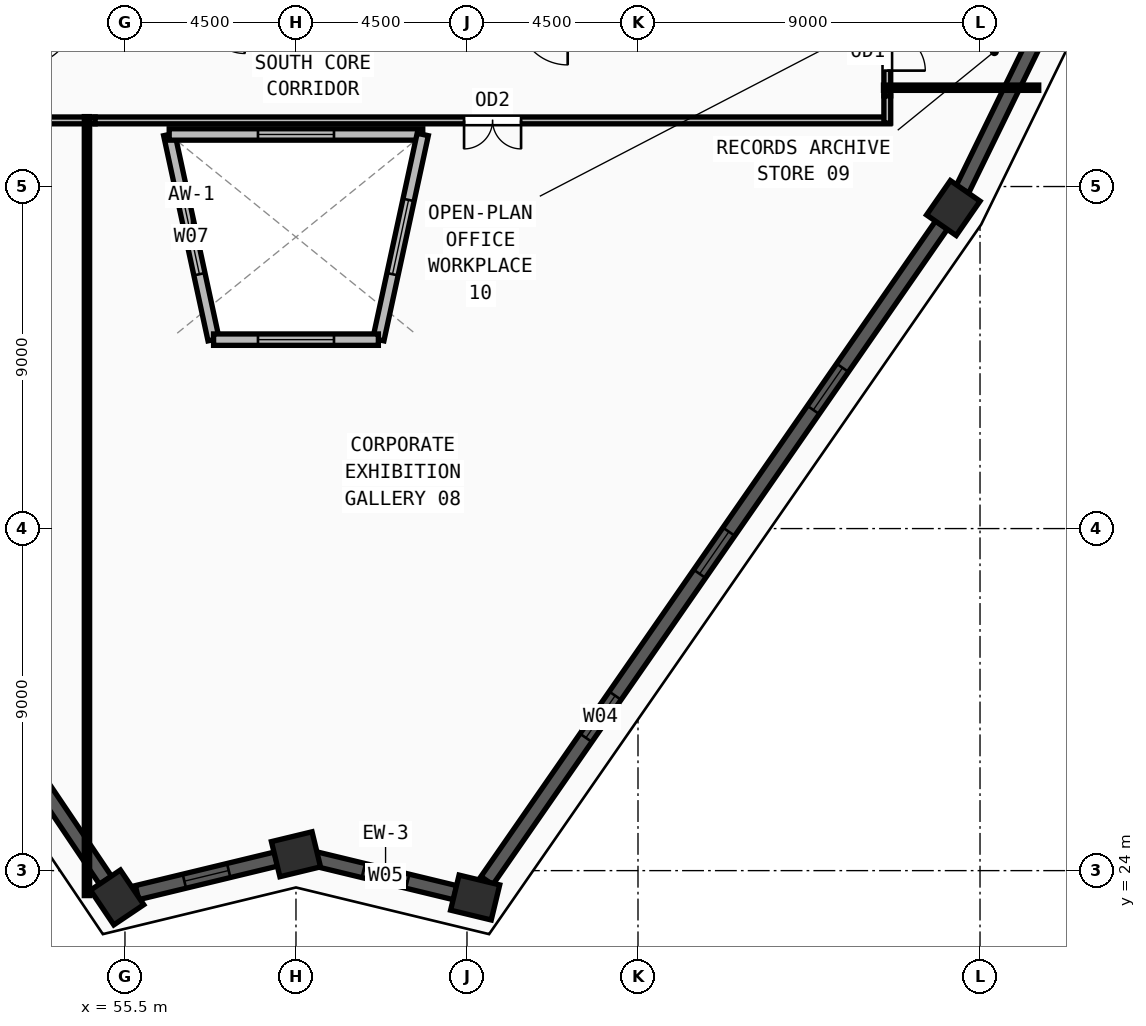
"""IFC4 building model, lengths in metres.
Left out: names, types, materials, properties, quantities, classifications, styles, units other than length and angle.
Written with IfcOpenShell. Run it as: python <this file> out.ifc"""

import sys

from ifc_helpers import new_model, si_unit, direction, frame, frame_2d, origin, origin_2d, place, context, subcontext, project, spatial, rectangle, extrude, source, transform, mapped, element, fill, save


model = new_model("IFC4")
c1 = context("Model", 3, precision=1e-05, world=origin(), true_north=direction((0.0, 1.0)))
c2 = subcontext(c1, "Body", "Model", "MODEL_VIEW")
j1 = project(units=[si_unit("LENGTHUNIT", "METRE"), si_unit("PLANEANGLEUNIT", "RADIAN")], contexts=[c1])
p1 = place(None, origin())
s1 = spatial("IfcSite", under=j1, at=p1, CompositionType="ELEMENT")
p2 = place(p1, origin())
s2 = spatial("IfcBuilding", under=s1, at=p2, CompositionType="ELEMENT")
p3 = place(p2, frame((0.0, 0.0, 339.75)))
s3 = spatial("IfcBuildingStorey", under=s2, at=p3, CompositionType="ELEMENT", Elevation=339.75)
m1 = source(origin(), c2, "Body", "SweptSolid", [
    extrude(rectangle(XDim=1.1, YDim=0.95, at=origin_2d()), origin(), (0.0, 0.0, 1.0), 3.75),
])
for number, where, z_axis, x_axis in (
    (1, (55.293, 23.294, 0.0), (0.0, 0.0, 1.0), (-0.559, 0.829, 0.0)),
    (2, (77.297, 41.434, 0.0), (0.0, 0.0, 1.0), (0.57, 0.822, 0.0)),
    (3, (64.715, 23.292, 0.0), (0.0, 0.0, 1.0), (-0.972, 0.235, 0.0)),
    (4, (60.0, 24.431, 0.0), (0.0, 0.0, 1.0), (0.972, 0.235, 0.0)),
):
    element("IfcColumn", number, at=place(p3, frame(where, z_axis=z_axis, x_axis=x_axis)), inside=s3, PredefinedType="COLUMN", context=c2, shape_type="MappedRepresentation", body=[
        mapped(m1, transform((0.0, 0.0, 0.0), x_axis=(1.0, 0.0, 0.0), y_axis=(0.0, 1.0, 0.0), z_axis=(0.0, 0.0, 1.0), scale=1.0)),
    ])
p4 = place(p3, frame((60.525, 24.304, 0.0), z_axis=(0.0, 0.0, 1.0), x_axis=(0.972061323931, -0.234727038319, 0.0)))
e5 = element("IfcWall", 5, at=p4, inside=s3, PredefinedType="SOLIDWALL", context=c2, shape_type="SweptSolid", body=[
    extrude(rectangle(XDim=3.77, YDim=0.38, at=frame_2d((1.885, 0.0))), origin(), (0.0, 0.0, 1.0), 3.57),
])
m2 = source(origin(), c2, "Body", "SweptSolid", [
    extrude(rectangle(XDim=1.2, YDim=1.9, at=frame_2d((0.6, 0.95))), frame((0.0, 0.2, 0.0), z_axis=(0.0, -1.0, 0.0), x_axis=(1.0, 0.0, 0.0)), (0.0, 0.0, 1.0), 0.4),
])
p5 = place(p4, frame((1.285, 0.0, 0.55)))
e6 = element("IfcOpeningElement", 6, at=p5, cuts=e5, PredefinedType="OPENING", context=c2, shape_type="MappedRepresentation", body=[
    mapped(m2, transform((0.0, 0.0, 0.0), x_axis=(1.0, 0.0, 0.0), y_axis=(0.0, 1.0, 0.0), z_axis=(0.0, 0.0, 1.0), scale=1.0)),
])
p6 = place(p3, frame((65.023, 23.736, 0.0), z_axis=(0.0, 0.0, 1.0), x_axis=(0.569887562459, 0.821722682025, 0.0)))
e7 = element("IfcWall", 7, at=p6, inside=s3, PredefinedType="SOLIDWALL", context=c2, shape_type="SweptSolid", body=[
    extrude(rectangle(XDim=20.997, YDim=0.38, at=frame_2d((10.499, 0.0))), origin(), (0.0, 0.0, 1.0), 3.57),
])
m3 = source(origin(), c2, "Body", "SweptSolid", [
    extrude(rectangle(XDim=1.35, YDim=1.85, at=frame_2d((0.675, 0.925))), frame((0.0, 0.2, 0.0), z_axis=(0.0, -1.0, 0.0), x_axis=(1.0, 0.0, 0.0)), (0.0, 0.0, 1.0), 0.4),
])
p7 = place(p6, frame((4.574, 0.0, 0.55)))
e8 = element("IfcOpeningElement", 8, at=p7, cuts=e7, PredefinedType="OPENING", context=c2, shape_type="MappedRepresentation", body=[
    mapped(m3, transform((0.0, 0.0, 0.0), x_axis=(1.0, 0.0, 0.0), y_axis=(0.0, 1.0, 0.0), z_axis=(0.0, 0.0, 1.0), scale=1.0)),
])
p8 = place(p6, frame((9.824, 0.0, 0.55)))
e9 = element("IfcOpeningElement", 9, at=p8, cuts=e7, PredefinedType="OPENING", context=c2, shape_type="MappedRepresentation", body=[
    mapped(m3, transform((0.0, 0.0, 0.0), x_axis=(1.0, 0.0, 0.0), y_axis=(0.0, 1.0, 0.0), z_axis=(0.0, 0.0, 1.0), scale=1.0)),
])
p9 = place(p6, frame((15.073, 0.0, 0.55)))
e10 = element("IfcOpeningElement", 10, at=p9, cuts=e7, PredefinedType="OPENING", context=c2, shape_type="MappedRepresentation", body=[
    mapped(m3, transform((0.0, 0.0, 0.0), x_axis=(1.0, 0.0, 0.0), y_axis=(0.0, 1.0, 0.0), z_axis=(0.0, 0.0, 1.0), scale=1.0)),
])
p10 = place(p3, frame((77.534, 41.919, 0.0), z_axis=(0.0, 0.0, 1.0), x_axis=(0.438992867409, 0.898490546619, 0.0)))
e11 = element("IfcWall", 11, at=p10, inside=s3, PredefinedType="SOLIDWALL", context=c2, shape_type="SweptSolid", body=[
    extrude(rectangle(XDim=25.456, YDim=0.38, at=frame_2d((12.728, 0.0))), origin(), (0.0, 0.0, 1.0), 3.57),
])
p11 = place(p10, frame((12.053, 0.0, 0.55)))
e12 = element("IfcOpeningElement", 12, at=p11, cuts=e11, PredefinedType="OPENING", context=c2, shape_type="MappedRepresentation", body=[
    mapped(m3, transform((0.0, 0.0, 0.0), x_axis=(1.0, 0.0, 0.0), y_axis=(0.0, 1.0, 0.0), z_axis=(0.0, 0.0, 1.0), scale=1.0)),
])
p12 = place(p10, frame((18.417, 0.0, 0.55)))
e13 = element("IfcOpeningElement", 13, at=p12, cuts=e11, PredefinedType="OPENING", context=c2, shape_type="MappedRepresentation", body=[
    mapped(m3, transform((0.0, 0.0, 0.0), x_axis=(1.0, 0.0, 0.0), y_axis=(0.0, 1.0, 0.0), z_axis=(0.0, 0.0, 1.0), scale=1.0)),
])
p13 = place(p3, frame((40.771, 44.855, 0.0), z_axis=(0.0, 0.0, 1.0), x_axis=(0.558627041585, -0.82941897037, 0.0)))
e14 = element("IfcWall", 14, at=p13, inside=s3, PredefinedType="SOLIDWALL", context=c2, shape_type="SweptSolid", body=[
    extrude(rectangle(XDim=25.455, YDim=0.38, at=frame_2d((12.728, 0.0))), origin(), (0.0, 0.0, 1.0), 3.57),
])
p14 = place(p13, frame((5.689, 0.0, 0.55)))
e15 = element("IfcOpeningElement", 15, at=p14, cuts=e14, PredefinedType="OPENING", context=c2, shape_type="MappedRepresentation", body=[
    mapped(m3, transform((0.0, 0.0, 0.0), x_axis=(1.0, 0.0, 0.0), y_axis=(0.0, 1.0, 0.0), z_axis=(0.0, 0.0, 1.0), scale=1.0)),
])
p15 = place(p13, frame((12.053, 0.0, 0.55)))
e16 = element("IfcOpeningElement", 16, at=p15, cuts=e14, PredefinedType="OPENING", context=c2, shape_type="MappedRepresentation", body=[
    mapped(m3, transform((0.0, 0.0, 0.0), x_axis=(1.0, 0.0, 0.0), y_axis=(0.0, 1.0, 0.0), z_axis=(0.0, 0.0, 1.0), scale=1.0)),
])
p16 = place(p13, frame((18.416, 0.0, 0.55)))
e17 = element("IfcOpeningElement", 17, at=p16, cuts=e14, PredefinedType="OPENING", context=c2, shape_type="MappedRepresentation", body=[
    mapped(m3, transform((0.0, 0.0, 0.0), x_axis=(1.0, 0.0, 0.0), y_axis=(0.0, 1.0, 0.0), z_axis=(0.0, 0.0, 1.0), scale=1.0)),
])
p17 = place(p3, frame((55.818, 23.421, 0.0), z_axis=(0.0, 0.0, 1.0), x_axis=(0.972061788498, 0.234725114427, 0.0)))
e18 = element("IfcWall", 18, at=p17, inside=s3, PredefinedType="SOLIDWALL", context=c2, shape_type="SweptSolid", body=[
    extrude(rectangle(XDim=3.762, YDim=0.38, at=frame_2d((1.881, 0.0))), origin(), (0.0, 0.0, 1.0), 3.57),
])
p18 = place(p17, frame((1.281, 0.0, 0.55)))
e19 = element("IfcOpeningElement", 19, at=p18, cuts=e18, PredefinedType="OPENING", context=c2, shape_type="MappedRepresentation", body=[
    mapped(m2, transform((0.0, 0.0, 0.0), x_axis=(1.0, 0.0, 0.0), y_axis=(0.0, 1.0, 0.0), z_axis=(0.0, 0.0, 1.0), scale=1.0)),
])
p19 = place(p3, frame((57.832, 37.971, 0.0), z_axis=(0.0, 0.0, 1.0), x_axis=(-0.211433211418, 0.977392447848, 0.0)))
e20 = element("IfcWall", 20, at=p19, inside=s3, PredefinedType="SOLIDWALL", context=c2, shape_type="SweptSolid", body=[
    extrude(rectangle(XDim=5.524, YDim=0.3, at=frame_2d((2.762, 0.0))), origin(), (0.0, 0.0, 1.0), 3.57),
])
m4 = source(origin(), c2, "Body", "SweptSolid", [
    extrude(rectangle(XDim=2.0, YDim=1.9, at=frame_2d((1.0, 0.95))), frame((0.0, 0.16, 0.0), z_axis=(0.0, -1.0, 0.0), x_axis=(1.0, 0.0, 0.0)), (0.0, 0.0, 1.0), 0.32),
])
p20 = place(p19, frame((1.762, 0.0, 0.55)))
e21 = element("IfcOpeningElement", 21, at=p20, cuts=e20, PredefinedType="OPENING", context=c2, shape_type="MappedRepresentation", body=[
    mapped(m4, transform((0.0, 0.0, 0.0), x_axis=(1.0, 0.0, 0.0), y_axis=(0.0, 1.0, 0.0), z_axis=(0.0, 0.0, 1.0), scale=1.0)),
])
p21 = place(p3, frame((56.664, 43.37, 0.0), z_axis=(0.0, 0.0, 1.0), x_axis=(1.0, 0.0, 0.0)))
e22 = element("IfcWall", 22, at=p21, inside=s3, PredefinedType="SOLIDWALL", context=c2, shape_type="SweptSolid", body=[
    extrude(rectangle(XDim=6.672, YDim=0.3, at=frame_2d((3.336, 0.0))), origin(), (0.0, 0.0, 1.0), 3.57),
])
p22 = place(p21, frame((2.336, 0.0, 0.55)))
e23 = element("IfcOpeningElement", 23, at=p22, cuts=e22, PredefinedType="OPENING", context=c2, shape_type="MappedRepresentation", body=[
    mapped(m4, transform((0.0, 0.0, 0.0), x_axis=(1.0, 0.0, 0.0), y_axis=(0.0, 1.0, 0.0), z_axis=(0.0, 0.0, 1.0), scale=1.0)),
])
p23 = place(p3, frame((63.336, 43.37, 0.0), z_axis=(0.0, 0.0, 1.0), x_axis=(-0.211433211418, -0.977392447848, 0.0)))
e24 = element("IfcWall", 24, at=p23, inside=s3, PredefinedType="SOLIDWALL", context=c2, shape_type="SweptSolid", body=[
    extrude(rectangle(XDim=5.524, YDim=0.3, at=frame_2d((2.762, 0.0))), origin(), (0.0, 0.0, 1.0), 3.57),
])
p24 = place(p23, frame((1.762, 0.0, 0.55)))
e25 = element("IfcOpeningElement", 25, at=p24, cuts=e24, PredefinedType="OPENING", context=c2, shape_type="MappedRepresentation", body=[
    mapped(m4, transform((0.0, 0.0, 0.0), x_axis=(1.0, 0.0, 0.0), y_axis=(0.0, 1.0, 0.0), z_axis=(0.0, 0.0, 1.0), scale=1.0)),
])
p25 = place(p3, frame((62.168, 37.971, 0.0), z_axis=(0.0, 0.0, 1.0), x_axis=(-1.0, 0.0, 0.0)))
e26 = element("IfcWall", 26, at=p25, inside=s3, PredefinedType="SOLIDWALL", context=c2, shape_type="SweptSolid", body=[
    extrude(rectangle(XDim=4.336, YDim=0.3, at=frame_2d((2.168, 0.0))), origin(), (0.0, 0.0, 1.0), 3.57),
])
p26 = place(p25, frame((1.168, 0.0, 0.55)))
e27 = element("IfcOpeningElement", 27, at=p26, cuts=e26, PredefinedType="OPENING", context=c2, shape_type="MappedRepresentation", body=[
    mapped(m4, transform((0.0, 0.0, 0.0), x_axis=(1.0, 0.0, 0.0), y_axis=(0.0, 1.0, 0.0), z_axis=(0.0, 0.0, 1.0), scale=1.0)),
])
p27 = place(p3, frame((54.715, 43.74, 0.0), z_axis=(0.0, 0.0, 1.0), x_axis=(-1.0, 0.0, 0.0)))
e28 = element("IfcWall", 28, at=p27, inside=s3, PredefinedType="PARTITIONING", context=c2, shape_type="SweptSolid", body=[
    extrude(rectangle(XDim=10.345, YDim=0.18, at=frame_2d((5.172, 0.0))), origin(), (0.0, 0.0, 1.0), 3.57),
])
m5 = source(origin(), c2, "Body", "SweptSolid", [
    extrude(rectangle(XDim=1.5, YDim=2.2, at=frame_2d((0.75, 1.1))), frame((0.0, 0.1, 0.0), z_axis=(0.0, -1.0, 0.0), x_axis=(1.0, 0.0, 0.0)), (0.0, 0.0, 1.0), 0.2),
])
p28 = place(p27, frame((4.423, 0.0, 0.0)))
e29 = element("IfcOpeningElement", 29, at=p28, cuts=e28, PredefinedType="OPENING", context=c2, shape_type="MappedRepresentation", body=[
    mapped(m5, transform((0.0, 0.0, 0.0), x_axis=(1.0, 0.0, 0.0), y_axis=(0.0, 1.0, 0.0), z_axis=(0.0, 0.0, 1.0), scale=1.0)),
])
p29 = place(p3, frame((75.63, 43.74, 0.0), z_axis=(0.0, 0.0, 1.0), x_axis=(-1.0, 0.0, 0.0)))
e30 = element("IfcWall", 30, at=p29, inside=s3, PredefinedType="PARTITIONING", context=c2, shape_type="SweptSolid", body=[
    extrude(rectangle(XDim=20.915, YDim=0.18, at=frame_2d((10.458, 0.0))), origin(), (0.0, 0.0, 1.0), 3.57),
])
p30 = place(p29, frame((9.707, 0.0, 0.0)))
e31 = element("IfcOpeningElement", 31, at=p30, cuts=e30, PredefinedType="OPENING", context=c2, shape_type="MappedRepresentation", body=[
    mapped(m5, transform((0.0, 0.0, 0.0), x_axis=(1.0, 0.0, 0.0), y_axis=(0.0, 1.0, 0.0), z_axis=(0.0, 0.0, 1.0), scale=1.0)),
])
p31 = place(p3, frame((75.56, 46.715, 0.0), z_axis=(0.0, 0.0, 1.0), x_axis=(0.0, -1.0, 0.0)))
e32 = element("IfcWall", 32, at=p31, inside=s3, PredefinedType="PARTITIONING", context=c2, shape_type="SweptSolid", body=[
    extrude(rectangle(XDim=2.33, YDim=0.18, at=frame_2d((1.165, 0.0))), origin(), (0.0, 0.0, 1.0), 3.57),
])
m6 = source(origin(), c2, "Body", "SweptSolid", [
    extrude(rectangle(XDim=1.0, YDim=2.2, at=frame_2d((0.5, 1.1))), frame((0.0, 0.1, 0.0), z_axis=(0.0, -1.0, 0.0), x_axis=(1.0, 0.0, 0.0)), (0.0, 0.0, 1.0), 0.2),
])
p32 = place(p31, frame((0.665, 0.0, 0.0)))
e33 = element("IfcOpeningElement", 33, at=p32, cuts=e32, PredefinedType="OPENING", context=c2, shape_type="MappedRepresentation", body=[
    mapped(m6, transform((0.0, 0.0, 0.0), x_axis=(1.0, 0.0, 0.0), y_axis=(0.0, 1.0, 0.0), z_axis=(0.0, 0.0, 1.0), scale=1.0)),
])
p33 = place(p3, frame((75.56, 44.385, 0.0), z_axis=(0.0, 0.0, 1.0), x_axis=(0.0, -1.0, 0.0)))
e34 = element("IfcWall", 34, at=p33, inside=s3, PredefinedType="PARTITIONING", context=c2, shape_type="SweptSolid", body=[
    extrude(rectangle(XDim=0.715, YDim=0.18, at=frame_2d((0.357, 0.0))), origin(), (0.0, 0.0, 1.0), 3.57),
])
p34 = place(p3, frame((75.46, 44.6, 0.0), z_axis=(0.0, 0.0, 1.0), x_axis=(1.0, 0.0, 0.0)))
e35 = element("IfcWall", 35, at=p34, inside=s3, PredefinedType="PARTITIONING", context=c2, shape_type="SweptSolid", body=[
    extrude(rectangle(XDim=4.085, YDim=0.14, at=frame_2d((2.042, 0.0))), origin(), (0.0, 0.0, 1.0), 3.57),
])
p35 = place(p3, frame((54.5, 43.84, 0.0), z_axis=(0.0, 0.0, 1.0), x_axis=(0.0, -1.0, 0.0)))
e36 = element("IfcWall", 36, at=p35, inside=s3, PredefinedType="PARTITIONING", context=c2, shape_type="SweptSolid", body=[
    extrude(rectangle(XDim=20.497, YDim=0.14, at=frame_2d((10.249, 0.0))), origin(), (0.0, 0.0, 1.0), 2.967),
])
m7 = source(origin(), c2, "Body", "SweptSolid", [
    extrude(rectangle(XDim=1.2, YDim=1.9, at=frame_2d((0.6, 0.95))), frame((0.0, 0.03, 0.0), z_axis=(0.0, -1.0, 0.0), x_axis=(1.0, 0.0, 0.0)), (0.0, 0.0, 1.0), 0.06),
])
p36 = place(p5, origin())
e37 = element("IfcWindow", 37, at=p36, inside=s3, PartitioningType="SINGLE_PANEL", PredefinedType="WINDOW", context=c2, shape_type="MappedRepresentation", body=[
    mapped(m7, transform((0.0, 0.0, 0.0), x_axis=(1.0, 0.0, 0.0), y_axis=(0.0, 1.0, 0.0), z_axis=(0.0, 0.0, 1.0), scale=1.0)),
])
fill(e6, e37)
m8 = source(origin(), c2, "Body", "SweptSolid", [
    extrude(rectangle(XDim=1.35, YDim=1.85, at=frame_2d((0.675, 0.925))), frame((0.0, 0.03, 0.0), z_axis=(0.0, -1.0, 0.0), x_axis=(1.0, 0.0, 0.0)), (0.0, 0.0, 1.0), 0.06),
])
p37 = place(p7, origin())
e38 = element("IfcWindow", 38, at=p37, inside=s3, PartitioningType="SINGLE_PANEL", PredefinedType="WINDOW", context=c2, shape_type="MappedRepresentation", body=[
    mapped(m8, transform((0.0, 0.0, 0.0), x_axis=(1.0, 0.0, 0.0), y_axis=(0.0, 1.0, 0.0), z_axis=(0.0, 0.0, 1.0), scale=1.0)),
])
fill(e8, e38)
p38 = place(p8, origin())
e39 = element("IfcWindow", 39, at=p38, inside=s3, PartitioningType="SINGLE_PANEL", PredefinedType="WINDOW", context=c2, shape_type="MappedRepresentation", body=[
    mapped(m8, transform((0.0, 0.0, 0.0), x_axis=(1.0, 0.0, 0.0), y_axis=(0.0, 1.0, 0.0), z_axis=(0.0, 0.0, 1.0), scale=1.0)),
])
fill(e9, e39)
p39 = place(p9, origin())
e40 = element("IfcWindow", 40, at=p39, inside=s3, PartitioningType="SINGLE_PANEL", PredefinedType="WINDOW", context=c2, shape_type="MappedRepresentation", body=[
    mapped(m8, transform((0.0, 0.0, 0.0), x_axis=(1.0, 0.0, 0.0), y_axis=(0.0, 1.0, 0.0), z_axis=(0.0, 0.0, 1.0), scale=1.0)),
])
fill(e10, e40)
p40 = place(p18, origin())
e41 = element("IfcWindow", 41, at=p40, inside=s3, PartitioningType="SINGLE_PANEL", PredefinedType="WINDOW", context=c2, shape_type="MappedRepresentation", body=[
    mapped(m7, transform((0.0, 0.0, 0.0), x_axis=(1.0, 0.0, 0.0), y_axis=(0.0, 1.0, 0.0), z_axis=(0.0, 0.0, 1.0), scale=1.0)),
])
fill(e19, e41)
m9 = source(origin(), c2, "Body", "SweptSolid", [
    extrude(rectangle(XDim=2.0, YDim=1.9, at=frame_2d((1.0, 0.95))), frame((0.0, 0.03, 0.0), z_axis=(0.0, -1.0, 0.0), x_axis=(1.0, 0.0, 0.0)), (0.0, 0.0, 1.0), 0.06),
])
p41 = place(p20, origin())
e42 = element("IfcWindow", 42, at=p41, inside=s3, PartitioningType="DOUBLE_PANEL_VERTICAL", PredefinedType="WINDOW", context=c2, shape_type="MappedRepresentation", body=[
    mapped(m9, transform((0.0, 0.0, 0.0), x_axis=(1.0, 0.0, 0.0), y_axis=(0.0, 1.0, 0.0), z_axis=(0.0, 0.0, 1.0), scale=1.0)),
])
fill(e21, e42)
p42 = place(p22, origin())
e43 = element("IfcWindow", 43, at=p42, inside=s3, PartitioningType="DOUBLE_PANEL_VERTICAL", PredefinedType="WINDOW", context=c2, shape_type="MappedRepresentation", body=[
    mapped(m9, transform((0.0, 0.0, 0.0), x_axis=(1.0, 0.0, 0.0), y_axis=(0.0, 1.0, 0.0), z_axis=(0.0, 0.0, 1.0), scale=1.0)),
])
fill(e23, e43)
p43 = place(p24, origin())
e44 = element("IfcWindow", 44, at=p43, inside=s3, PartitioningType="DOUBLE_PANEL_VERTICAL", PredefinedType="WINDOW", context=c2, shape_type="MappedRepresentation", body=[
    mapped(m9, transform((0.0, 0.0, 0.0), x_axis=(1.0, 0.0, 0.0), y_axis=(0.0, 1.0, 0.0), z_axis=(0.0, 0.0, 1.0), scale=1.0)),
])
fill(e25, e44)
p44 = place(p26, origin())
e45 = element("IfcWindow", 45, at=p44, inside=s3, PartitioningType="DOUBLE_PANEL_VERTICAL", PredefinedType="WINDOW", context=c2, shape_type="MappedRepresentation", body=[
    mapped(m9, transform((0.0, 0.0, 0.0), x_axis=(1.0, 0.0, 0.0), y_axis=(0.0, 1.0, 0.0), z_axis=(0.0, 0.0, 1.0), scale=1.0)),
])
fill(e27, e45)
m10 = source(origin(), c2, "Body", "SweptSolid", [
    extrude(rectangle(XDim=1.5, YDim=2.2, at=frame_2d((0.75, 1.1))), frame((0.0, 0.025, 0.0), z_axis=(0.0, -1.0, 0.0), x_axis=(1.0, 0.0, 0.0)), (0.0, 0.0, 1.0), 0.05),
])
p45 = place(p30, origin())
e46 = element("IfcDoor", 46, at=p45, inside=s3, OperationType="DOUBLE_DOOR_SINGLE_SWING", PredefinedType="DOOR", context=c2, shape_type="MappedRepresentation", body=[
    mapped(m10, transform((0.0, 0.0, 0.0), x_axis=(1.0, 0.0, 0.0), y_axis=(0.0, 1.0, 0.0), z_axis=(0.0, 0.0, 1.0), scale=1.0)),
])
fill(e31, e46)
m11 = source(origin(), c2, "Body", "SweptSolid", [
    extrude(rectangle(XDim=1.0, YDim=2.2, at=frame_2d((0.5, 1.1))), frame((0.0, 0.025, 0.0), z_axis=(0.0, -1.0, 0.0), x_axis=(1.0, 0.0, 0.0)), (0.0, 0.0, 1.0), 0.05),
])
p46 = place(p32, origin())
e47 = element("IfcDoor", 47, at=p46, inside=s3, OperationType="SINGLE_SWING_RIGHT", PredefinedType="DOOR", context=c2, shape_type="MappedRepresentation", body=[
    mapped(m11, transform((0.0, 0.0, 0.0), x_axis=(1.0, 0.0, 0.0), y_axis=(0.0, 1.0, 0.0), z_axis=(0.0, 0.0, 1.0), scale=1.0)),
])
fill(e33, e47)
save(model, sys.argv[1])
